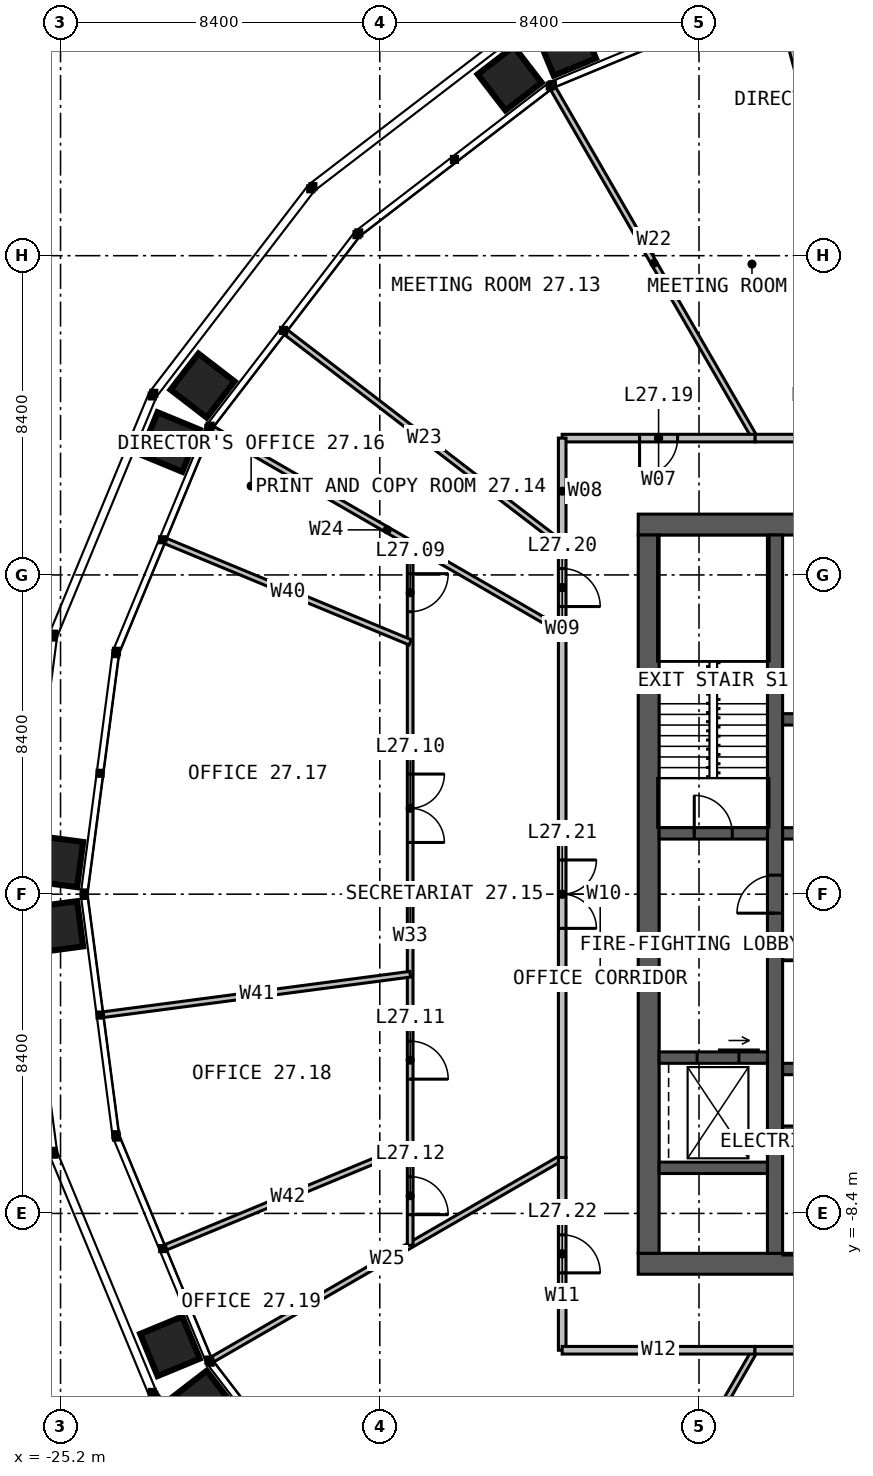
"""IFC4 building model, lengths in metres.
Left out: names, types, materials, properties, quantities, classifications, styles, units other than length and angle.
Written with IfcOpenShell. Run it as: python <this file> out.ifc"""

import sys

from ifc_helpers import new_model, si_unit, direction, frame, frame_2d, origin, place, context, subcontext, project, spatial, rectangle, extrude, element, fill, save


model = new_model("IFC4")
c1 = context("Model", 3, precision=1e-05, world=origin(), true_north=direction((0.0, 1.0)))
c2 = subcontext(c1, "Body", "Model", "MODEL_VIEW")
j1 = project(units=[si_unit("LENGTHUNIT", "METRE"), si_unit("PLANEANGLEUNIT", "RADIAN")], contexts=[c1])
p1 = place(None, origin())
s1 = spatial("IfcSite", under=j1, at=p1, CompositionType="ELEMENT")
p2 = place(p1, origin())
s2 = spatial("IfcBuilding", under=s1, at=p2, CompositionType="ELEMENT")
p3 = place(p2, frame((0.0, 0.0, 114.0)))
s3 = spatial("IfcBuildingStorey", under=s2, at=p3, CompositionType="ELEMENT", Elevation=114.0)
p4 = place(p3, frame((-10.0, 9.725, 0.0), z_axis=(0.0, 0.0, 1.0), x_axis=(1.0, 0.0, 0.0)))
e1 = element("IfcWall", 1, at=p4, inside=s3, PredefinedType="SOLIDWALL", context=c2, shape_type="SweptSolid", body=[
    extrude(rectangle(XDim=20.0, YDim=0.55, at=frame_2d((10.0, 0.0))), origin(), (0.0, 0.0, 1.0), 4.0),
])
p5 = place(p4, frame((9.4, 0.0, 0.0)))
e2 = element("IfcOpeningElement", 2, at=p5, cuts=e1, PredefinedType="OPENING", context=c2, shape_type="SweptSolid", body=[
    extrude(rectangle(XDim=1.2, YDim=2.2, at=frame_2d((0.6, 1.1))), frame((0.0, 0.285, 0.0), z_axis=(0.0, -1.0, 0.0), x_axis=(1.0, 0.0, 0.0)), (0.0, 0.0, 1.0), 0.57),
])
p6 = place(p3, frame((10.0, -9.725, 0.0), z_axis=(0.0, 0.0, 1.0), x_axis=(-1.0, 0.0, 0.0)))
e3 = element("IfcWall", 3, at=p6, inside=s3, PredefinedType="SOLIDWALL", context=c2, shape_type="SweptSolid", body=[
    extrude(rectangle(XDim=20.0, YDim=0.55, at=frame_2d((10.0, 0.0))), origin(), (0.0, 0.0, 1.0), 4.0),
])
p7 = place(p6, frame((6.875, 0.0, 0.0)))
e4 = element("IfcOpeningElement", 4, at=p7, cuts=e3, PredefinedType="OPENING", context=c2, shape_type="SweptSolid", body=[
    extrude(rectangle(XDim=1.2, YDim=2.2, at=frame_2d((0.6, 1.1))), frame((0.0, 0.285, 0.0), z_axis=(0.0, -1.0, 0.0), x_axis=(1.0, 0.0, 0.0)), (0.0, 0.0, 1.0), 0.57),
])
p8 = place(p3, frame((-9.725, 9.45, 0.0), z_axis=(0.0, 0.0, 1.0), x_axis=(0.0, -1.0, 0.0)))
e5 = element("IfcWall", 5, at=p8, inside=s3, PredefinedType="SOLIDWALL", context=c2, shape_type="SweptSolid", body=[
    extrude(rectangle(XDim=18.9, YDim=0.55, at=frame_2d((9.45, 0.0))), origin(), (0.0, 0.0, 1.0), 4.0),
])
p9 = place(p3, frame((-6.4, -9.45, 0.0), z_axis=(0.0, 0.0, 1.0), x_axis=(0.0, 1.0, 0.0)))
e6 = element("IfcWall", 6, at=p9, inside=s3, PredefinedType="SOLIDWALL", context=c2, shape_type="SweptSolid", body=[
    extrude(rectangle(XDim=18.9, YDim=0.4, at=frame_2d((9.45, 0.0))), origin(), (0.0, 0.0, 1.0), 4.0),
])
p10 = place(p9, frame((8.95, 0.0, 0.0)))
e7 = element("IfcOpeningElement", 7, at=p10, cuts=e6, PredefinedType="OPENING", context=c2, shape_type="SweptSolid", body=[
    extrude(rectangle(XDim=1.0, YDim=2.2, at=frame_2d((0.5, 1.1))), frame((0.0, 0.21, 0.0), z_axis=(0.0, -1.0, 0.0), x_axis=(1.0, 0.0, 0.0)), (0.0, 0.0, 1.0), 0.42),
])
p11 = place(p3, frame((-6.2, 1.6, 0.0), z_axis=(0.0, 0.0, 1.0), x_axis=(1.0, 0.0, 0.0)))
e8 = element("IfcWall", 8, at=p11, inside=s3, PredefinedType="SOLIDWALL", context=c2, shape_type="SweptSolid", body=[
    extrude(rectangle(XDim=4.85, YDim=0.3, at=frame_2d((2.425, 0.0))), origin(), (0.0, 0.0, 1.0), 4.0),
])
p12 = place(p11, frame((0.625, 0.0, 0.0)))
e9 = element("IfcOpeningElement", 9, at=p12, cuts=e8, PredefinedType="OPENING", context=c2, shape_type="SweptSolid", body=[
    extrude(rectangle(XDim=1.1, YDim=2.2, at=frame_2d((0.55, 1.1))), frame((0.0, 0.16, 0.0), z_axis=(0.0, -1.0, 0.0), x_axis=(1.0, 0.0, 0.0)), (0.0, 0.0, 1.0), 0.32),
])
p13 = place(p11, frame((3.15, 0.0, 0.0)))
e10 = element("IfcOpeningElement", 10, at=p13, cuts=e8, PredefinedType="OPENING", context=c2, shape_type="SweptSolid", body=[
    extrude(rectangle(XDim=1.1, YDim=2.2, at=frame_2d((0.55, 1.1))), frame((0.0, 0.16, 0.0), z_axis=(0.0, -1.0, 0.0), x_axis=(1.0, 0.0, 0.0)), (0.0, 0.0, 1.0), 0.32),
])
p14 = place(p3, frame((-6.2, 4.6, 0.0), z_axis=(0.0, 0.0, 1.0), x_axis=(1.0, 0.0, 0.0)))
e11 = element("IfcWall", 11, at=p14, inside=s3, PredefinedType="SOLIDWALL", context=c2, shape_type="SweptSolid", body=[
    extrude(rectangle(XDim=4.85, YDim=0.3, at=frame_2d((2.425, 0.0))), origin(), (0.0, 0.0, 1.0), 4.0),
])
for number, where, z_axis, x_axis in (
    (12, (-6.2, -1.6, 0.0), (0.0, 0.0, 1.0), (1.0, 0.0, 0.0)),
    (13, (-6.2, -4.6, 0.0), (0.0, 0.0, 1.0), (1.0, 0.0, 0.0)),
):
    element("IfcWall", number, at=place(p3, frame(where, z_axis=z_axis, x_axis=x_axis)), inside=s3, PredefinedType="SOLIDWALL", context=c2, shape_type="SweptSolid", body=[
        extrude(rectangle(XDim=7.4, YDim=0.3, at=frame_2d((3.7, 0.0))), origin(), (0.0, 0.0, 1.0), 4.0),
    ])
p15 = place(p3, frame((-6.2, -6.2, 0.0), z_axis=(0.0, 0.0, 1.0), x_axis=(1.0, 0.0, 0.0)))
e14 = element("IfcWall", 14, at=p15, inside=s3, PredefinedType="SOLIDWALL", context=c2, shape_type="SweptSolid", body=[
    extrude(rectangle(XDim=7.4, YDim=0.2, at=frame_2d((3.7, 0.0))), origin(), (0.0, 0.0, 1.0), 4.0),
])
p16 = place(p3, frame((-9.45, 1.6, 0.0), z_axis=(0.0, 0.0, 1.0), x_axis=(1.0, 0.0, 0.0)))
e15 = element("IfcWall", 15, at=p16, inside=s3, PredefinedType="SOLIDWALL", context=c2, shape_type="SweptSolid", body=[
    extrude(rectangle(XDim=2.85, YDim=0.3, at=frame_2d((1.425, 0.0))), origin(), (0.0, 0.0, 1.0), 4.0),
])
p17 = place(p16, frame((0.925, 0.0, 0.0)))
e16 = element("IfcOpeningElement", 16, at=p17, cuts=e15, PredefinedType="OPENING", context=c2, shape_type="SweptSolid", body=[
    extrude(rectangle(XDim=1.0, YDim=2.2, at=frame_2d((0.5, 1.1))), frame((0.0, 0.16, 0.0), z_axis=(0.0, -1.0, 0.0), x_axis=(1.0, 0.0, 0.0)), (0.0, 0.0, 1.0), 0.32),
])
p18 = place(p3, frame((-9.45, -4.3, 0.0), z_axis=(0.0, 0.0, 1.0), x_axis=(1.0, 0.0, 0.0)))
e17 = element("IfcWall", 17, at=p18, inside=s3, PredefinedType="SOLIDWALL", context=c2, shape_type="SweptSolid", body=[
    extrude(rectangle(XDim=2.85, YDim=0.3, at=frame_2d((1.425, 0.0))), origin(), (0.0, 0.0, 1.0), 4.0),
])
p19 = place(p18, frame((1.0, 0.0, 0.0)))
e18 = element("IfcOpeningElement", 18, at=p19, cuts=e17, PredefinedType="OPENING", context=c2, shape_type="SweptSolid", body=[
    extrude(rectangle(XDim=1.1, YDim=2.2, at=frame_2d((0.55, 1.1))), frame((0.0, 0.16, 0.0), z_axis=(0.0, -1.0, 0.0), x_axis=(1.0, 0.0, 0.0)), (0.0, 0.0, 1.0), 0.32),
])
p20 = place(p3, frame((-9.45, -7.2, 0.0), z_axis=(0.0, 0.0, 1.0), x_axis=(1.0, 0.0, 0.0)))
e19 = element("IfcWall", 19, at=p20, inside=s3, PredefinedType="SOLIDWALL", context=c2, shape_type="SweptSolid", body=[
    extrude(rectangle(XDim=2.85, YDim=0.3, at=frame_2d((1.425, 0.0))), origin(), (0.0, 0.0, 1.0), 4.0),
])
p21 = place(p3, frame((-3.215, 12.0, 0.0), z_axis=(0.0, 0.0, 1.0), x_axis=(-0.258814986396, 0.965926913807, 0.0)))
e20 = element("IfcWall", 20, at=p21, inside=s3, PredefinedType="PARTITIONING", context=c2, shape_type="SweptSolid", body=[
    extrude(rectangle(XDim=12.064, YDim=0.15, at=frame_2d((6.032, 0.0))), origin(), (0.0, 0.0, 1.0), 2.79),
])
p22 = place(p3, frame((-6.928, 12.0, 0.0), z_axis=(0.0, 0.0, 1.0), x_axis=(-0.500002090115, 0.866024197053, 0.0)))
e21 = element("IfcWall", 21, at=p22, inside=s3, PredefinedType="PARTITIONING", context=c2, shape_type="SweptSolid", body=[
    extrude(rectangle(XDim=10.631, YDim=0.15, at=frame_2d((5.315, 0.0))), origin(), (0.0, 0.0, 1.0), 2.79),
])
p23 = place(p3, frame((-12.0, 9.208, 0.0), z_axis=(0.0, 0.0, 1.0), x_axis=(-0.793357264949, 0.608756314261, 0.0)))
e22 = element("IfcWall", 22, at=p23, inside=s3, PredefinedType="PARTITIONING", context=c2, shape_type="SweptSolid", body=[
    extrude(rectangle(XDim=9.152, YDim=0.15, at=frame_2d((4.576, 0.0))), origin(), (0.0, 0.0, 1.0), 2.79),
])
for number, where, z_axis, x_axis in (
    (23, (-12.0, 6.928, 0.0), (0.0, 0.0, 1.0), (-0.866, 0.5, 0.0)),
    (24, (-12.0, -6.928, 0.0), (0.0, 0.0, 1.0), (-0.866, -0.5, 0.0)),
    (25, (-6.928, -12.0, 0.0), (0.0, 0.0, 1.0), (-0.5, -0.866, 0.0)),
):
    element("IfcWall", number, at=place(p3, frame(where, z_axis=z_axis, x_axis=x_axis)), inside=s3, PredefinedType="PARTITIONING", context=c2, shape_type="SweptSolid", body=[
        extrude(rectangle(XDim=10.631, YDim=0.15, at=frame_2d((5.315, 0.0))), origin(), (0.0, 0.0, 1.0), 2.79),
    ])
p24 = place(p3, frame((-3.215, 12.0, 0.0), z_axis=(0.0, 0.0, 1.0), x_axis=(-1.0, 0.0, 0.0)))
e26 = element("IfcWall", 26, at=p24, inside=s3, PredefinedType="PARTITIONING", context=c2, shape_type="SweptSolid", body=[
    extrude(rectangle(XDim=3.713, YDim=0.2, at=frame_2d((1.856, 0.0))), origin(), (0.0, 0.0, 1.0), 3.8),
])
p25 = place(p24, frame((1.356, 0.0, 0.0)))
e27 = element("IfcOpeningElement", 27, at=p25, cuts=e26, PredefinedType="OPENING", context=c2, shape_type="SweptSolid", body=[
    extrude(rectangle(XDim=1.0, YDim=2.2, at=frame_2d((0.5, 1.1))), frame((0.0, 0.11, 0.0), z_axis=(0.0, -1.0, 0.0), x_axis=(1.0, 0.0, 0.0)), (0.0, 0.0, 1.0), 0.22),
])
p26 = place(p3, frame((-6.928, 12.0, 0.0), z_axis=(0.0, 0.0, 1.0), x_axis=(-1.0, 0.0, 0.0)))
e28 = element("IfcWall", 28, at=p26, inside=s3, PredefinedType="PARTITIONING", context=c2, shape_type="SweptSolid", body=[
    extrude(rectangle(XDim=5.072, YDim=0.2, at=frame_2d((2.536, 0.0))), origin(), (0.0, 0.0, 1.0), 3.8),
])
p27 = place(p26, frame((2.036, 0.0, 0.0)))
e29 = element("IfcOpeningElement", 29, at=p27, cuts=e28, PredefinedType="OPENING", context=c2, shape_type="SweptSolid", body=[
    extrude(rectangle(XDim=1.0, YDim=2.2, at=frame_2d((0.5, 1.1))), frame((0.0, 0.11, 0.0), z_axis=(0.0, -1.0, 0.0), x_axis=(1.0, 0.0, 0.0)), (0.0, 0.0, 1.0), 0.22),
])
p28 = place(p3, frame((-12.0, 12.0, 0.0), z_axis=(0.0, 0.0, 1.0), x_axis=(0.0, -1.0, 0.0)))
e30 = element("IfcWall", 30, at=p28, inside=s3, PredefinedType="PARTITIONING", context=c2, shape_type="SweptSolid", body=[
    extrude(rectangle(XDim=2.792, YDim=0.2, at=frame_2d((1.396, 0.0))), origin(), (0.0, 0.0, 1.0), 3.8),
])
p29 = place(p3, frame((-12.0, 9.208, 0.0), z_axis=(0.0, 0.0, 1.0), x_axis=(0.0, -1.0, 0.0)))
e31 = element("IfcWall", 31, at=p29, inside=s3, PredefinedType="PARTITIONING", context=c2, shape_type="SweptSolid", body=[
    extrude(rectangle(XDim=2.28, YDim=0.2, at=frame_2d((1.14, 0.0))), origin(), (0.0, 0.0, 1.0), 3.8),
])
p30 = place(p29, frame((0.64, 0.0, 0.0)))
e32 = element("IfcOpeningElement", 32, at=p30, cuts=e31, PredefinedType="OPENING", context=c2, shape_type="SweptSolid", body=[
    extrude(rectangle(XDim=1.0, YDim=2.2, at=frame_2d((0.5, 1.1))), frame((0.0, 0.11, 0.0), z_axis=(0.0, -1.0, 0.0), x_axis=(1.0, 0.0, 0.0)), (0.0, 0.0, 1.0), 0.22),
])
p31 = place(p3, frame((-16.0, 9.238, 0.0), z_axis=(0.0, 0.0, 1.0), x_axis=(0.0, -1.0, 0.0)))
e33 = element("IfcWall", 33, at=p31, inside=s3, PredefinedType="PARTITIONING", context=c2, shape_type="SweptSolid", body=[
    extrude(rectangle(XDim=18.475, YDim=0.15, at=frame_2d((9.238, 0.0))), origin(), (0.0, 0.0, 1.0), 2.79),
])
p32 = place(p31, frame((0.805, 0.0, 0.0)))
e34 = element("IfcOpeningElement", 34, at=p32, cuts=e33, PredefinedType="OPENING", context=c2, shape_type="SweptSolid", body=[
    extrude(rectangle(XDim=1.0, YDim=2.2, at=frame_2d((0.5, 1.1))), frame((0.0, 0.085, 0.0), z_axis=(0.0, -1.0, 0.0), x_axis=(1.0, 0.0, 0.0)), (0.0, 0.0, 1.0), 0.17),
])
p33 = place(p31, frame((6.077, 0.0, 0.0)))
e35 = element("IfcOpeningElement", 35, at=p33, cuts=e33, PredefinedType="OPENING", context=c2, shape_type="SweptSolid", body=[
    extrude(rectangle(XDim=1.8, YDim=2.2, at=frame_2d((0.9, 1.1))), frame((0.0, 0.085, 0.0), z_axis=(0.0, -1.0, 0.0), x_axis=(1.0, 0.0, 0.0)), (0.0, 0.0, 1.0), 0.17),
])
p34 = place(p31, frame((13.104, 0.0, 0.0)))
e36 = element("IfcOpeningElement", 36, at=p34, cuts=e33, PredefinedType="OPENING", context=c2, shape_type="SweptSolid", body=[
    extrude(rectangle(XDim=1.0, YDim=2.2, at=frame_2d((0.5, 1.1))), frame((0.0, 0.085, 0.0), z_axis=(0.0, -1.0, 0.0), x_axis=(1.0, 0.0, 0.0)), (0.0, 0.0, 1.0), 0.17),
])
p35 = place(p31, frame((16.67, 0.0, 0.0)))
e37 = element("IfcOpeningElement", 37, at=p35, cuts=e33, PredefinedType="OPENING", context=c2, shape_type="SweptSolid", body=[
    extrude(rectangle(XDim=1.0, YDim=2.2, at=frame_2d((0.5, 1.1))), frame((0.0, 0.085, 0.0), z_axis=(0.0, -1.0, 0.0), x_axis=(1.0, 0.0, 0.0)), (0.0, 0.0, 1.0), 0.17),
])
p36 = place(p3, frame((-16.0, 6.627, 0.0), z_axis=(0.0, 0.0, 1.0), x_axis=(-0.923876163616, 0.382691565496, 0.0)))
e38 = element("IfcWall", 38, at=p36, inside=s3, PredefinedType="PARTITIONING", context=c2, shape_type="SweptSolid", body=[
    extrude(rectangle(XDim=6.959, YDim=0.15, at=frame_2d((3.48, 0.0))), origin(), (0.0, 0.0, 1.0), 2.79),
])
p37 = place(p3, frame((-16.0, -2.106, 0.0), z_axis=(0.0, 0.0, 1.0), x_axis=(-0.99144398145, -0.13053287573, 0.0)))
e39 = element("IfcWall", 39, at=p37, inside=s3, PredefinedType="PARTITIONING", context=c2, shape_type="SweptSolid", body=[
    extrude(rectangle(XDim=8.14, YDim=0.15, at=frame_2d((4.07, 0.0))), origin(), (0.0, 0.0, 1.0), 2.79),
])
p38 = place(p3, frame((-16.0, -6.627, 0.0), z_axis=(0.0, 0.0, 1.0), x_axis=(-0.923876163616, -0.382691565496, 0.0)))
e40 = element("IfcWall", 40, at=p38, inside=s3, PredefinedType="PARTITIONING", context=c2, shape_type="SweptSolid", body=[
    extrude(rectangle(XDim=6.959, YDim=0.15, at=frame_2d((3.48, 0.0))), origin(), (0.0, 0.0, 1.0), 2.79),
])
p39 = place(p3, frame((-12.0, 6.928, 0.0), z_axis=(0.0, 0.0, 1.0), x_axis=(0.0, -1.0, 0.0)))
e41 = element("IfcWall", 41, at=p39, inside=s3, PredefinedType="PARTITIONING", context=c2, shape_type="SweptSolid", body=[
    extrude(rectangle(XDim=13.856, YDim=0.2, at=frame_2d((6.928, 0.0))), origin(), (0.0, 0.0, 1.0), 3.8),
])
p40 = place(p39, frame((6.028, 0.0, 0.0)))
e42 = element("IfcOpeningElement", 42, at=p40, cuts=e41, PredefinedType="OPENING", context=c2, shape_type="SweptSolid", body=[
    extrude(rectangle(XDim=1.8, YDim=2.2, at=frame_2d((0.9, 1.1))), frame((0.0, 0.11, 0.0), z_axis=(0.0, -1.0, 0.0), x_axis=(1.0, 0.0, 0.0)), (0.0, 0.0, 1.0), 0.22),
])
p41 = place(p3, frame((-12.0, -6.928, 0.0), z_axis=(0.0, 0.0, 1.0), x_axis=(0.0, -1.0, 0.0)))
e43 = element("IfcWall", 43, at=p41, inside=s3, PredefinedType="PARTITIONING", context=c2, shape_type="SweptSolid", body=[
    extrude(rectangle(XDim=5.072, YDim=0.2, at=frame_2d((2.536, 0.0))), origin(), (0.0, 0.0, 1.0), 3.8),
])
p42 = place(p41, frame((2.036, 0.0, 0.0)))
e44 = element("IfcOpeningElement", 44, at=p42, cuts=e43, PredefinedType="OPENING", context=c2, shape_type="SweptSolid", body=[
    extrude(rectangle(XDim=1.0, YDim=2.2, at=frame_2d((0.5, 1.1))), frame((0.0, 0.11, 0.0), z_axis=(0.0, -1.0, 0.0), x_axis=(1.0, 0.0, 0.0)), (0.0, 0.0, 1.0), 0.22),
])
p43 = place(p3, frame((-12.0, -12.0, 0.0), z_axis=(0.0, 0.0, 1.0), x_axis=(1.0, 0.0, 0.0)))
e45 = element("IfcWall", 45, at=p43, inside=s3, PredefinedType="PARTITIONING", context=c2, shape_type="SweptSolid", body=[
    extrude(rectangle(XDim=5.072, YDim=0.2, at=frame_2d((2.536, 0.0))), origin(), (0.0, 0.0, 1.0), 3.8),
])
p44 = place(p3, frame((-6.928, -12.0, 0.0), z_axis=(0.0, 0.0, 1.0), x_axis=(1.0, 0.0, 0.0)))
e46 = element("IfcWall", 46, at=p44, inside=s3, PredefinedType="PARTITIONING", context=c2, shape_type="SweptSolid", body=[
    extrude(rectangle(XDim=10.144, YDim=0.2, at=frame_2d((5.072, 0.0))), origin(), (0.0, 0.0, 1.0), 3.8),
])
p45 = place(p44, frame((4.172, 0.0, 0.0)))
e47 = element("IfcOpeningElement", 47, at=p45, cuts=e46, PredefinedType="OPENING", context=c2, shape_type="SweptSolid", body=[
    extrude(rectangle(XDim=1.8, YDim=2.2, at=frame_2d((0.9, 1.1))), frame((0.0, 0.11, 0.0), z_axis=(0.0, -1.0, 0.0), x_axis=(1.0, 0.0, 0.0)), (0.0, 0.0, 1.0), 0.22),
])
p46 = place(p10, origin())
e48 = element("IfcDoor", 48, at=p46, inside=s3, OperationType="SINGLE_SWING_LEFT", PredefinedType="DOOR", context=c2, shape_type="SweptSolid", body=[
    extrude(rectangle(XDim=1.0, YDim=2.2, at=frame_2d((0.5, 1.1))), frame((0.0, 0.025, 0.0), z_axis=(0.0, -1.0, 0.0), x_axis=(1.0, 0.0, 0.0)), (0.0, 0.0, 1.0), 0.05),
])
fill(e7, e48)
p47 = place(p17, origin())
e49 = element("IfcDoor", 49, at=p47, inside=s3, OperationType="SINGLE_SWING_LEFT", PredefinedType="DOOR", context=c2, shape_type="SweptSolid", body=[
    extrude(rectangle(XDim=1.0, YDim=2.2, at=frame_2d((0.5, 1.1))), frame((0.0, 0.025, 0.0), z_axis=(0.0, -1.0, 0.0), x_axis=(1.0, 0.0, 0.0)), (0.0, 0.0, 1.0), 0.05),
])
fill(e16, e49)
p48 = place(p19, origin())
e50 = element("IfcDoor", 50, at=p48, inside=s3, OperationType="SLIDING_TO_LEFT", PredefinedType="DOOR", context=c2, shape_type="SweptSolid", body=[
    extrude(rectangle(XDim=1.1, YDim=2.2, at=frame_2d((0.55, 1.1))), frame((0.0, 0.025, 0.0), z_axis=(0.0, -1.0, 0.0), x_axis=(1.0, 0.0, 0.0)), (0.0, 0.0, 1.0), 0.05),
])
fill(e18, e50)
p49 = place(p27, origin())
e51 = element("IfcDoor", 51, at=p49, inside=s3, OperationType="SINGLE_SWING_RIGHT", PredefinedType="DOOR", context=c2, shape_type="SweptSolid", body=[
    extrude(rectangle(XDim=1.0, YDim=2.2, at=frame_2d((0.5, 1.1))), frame((0.0, 0.025, 0.0), z_axis=(0.0, -1.0, 0.0), x_axis=(1.0, 0.0, 0.0)), (0.0, 0.0, 1.0), 0.05),
])
fill(e29, e51)
p50 = place(p30, origin())
e52 = element("IfcDoor", 52, at=p50, inside=s3, OperationType="SINGLE_SWING_RIGHT", PredefinedType="DOOR", context=c2, shape_type="SweptSolid", body=[
    extrude(rectangle(XDim=1.0, YDim=2.2, at=frame_2d((0.5, 1.1))), frame((0.0, 0.025, 0.0), z_axis=(0.0, -1.0, 0.0), x_axis=(1.0, 0.0, 0.0)), (0.0, 0.0, 1.0), 0.05),
])
fill(e32, e52)
p51 = place(p32, origin())
e53 = element("IfcDoor", 53, at=p51, inside=s3, OperationType="SINGLE_SWING_LEFT", PredefinedType="DOOR", context=c2, shape_type="SweptSolid", body=[
    extrude(rectangle(XDim=1.0, YDim=2.2, at=frame_2d((0.5, 1.1))), frame((0.0, 0.025, 0.0), z_axis=(0.0, -1.0, 0.0), x_axis=(1.0, 0.0, 0.0)), (0.0, 0.0, 1.0), 0.05),
])
fill(e34, e53)
p52 = place(p33, origin())
e54 = element("IfcDoor", 54, at=p52, inside=s3, OperationType="DOUBLE_DOOR_SINGLE_SWING", PredefinedType="DOOR", context=c2, shape_type="SweptSolid", body=[
    extrude(rectangle(XDim=1.8, YDim=2.2, at=frame_2d((0.9, 1.1))), frame((0.0, 0.025, 0.0), z_axis=(0.0, -1.0, 0.0), x_axis=(1.0, 0.0, 0.0)), (0.0, 0.0, 1.0), 0.05),
])
fill(e35, e54)
p53 = place(p34, origin())
e55 = element("IfcDoor", 55, at=p53, inside=s3, OperationType="SINGLE_SWING_RIGHT", PredefinedType="DOOR", context=c2, shape_type="SweptSolid", body=[
    extrude(rectangle(XDim=1.0, YDim=2.2, at=frame_2d((0.5, 1.1))), frame((0.0, 0.025, 0.0), z_axis=(0.0, -1.0, 0.0), x_axis=(1.0, 0.0, 0.0)), (0.0, 0.0, 1.0), 0.05),
])
fill(e36, e55)
p54 = place(p35, origin())
e56 = element("IfcDoor", 56, at=p54, inside=s3, OperationType="SINGLE_SWING_RIGHT", PredefinedType="DOOR", context=c2, shape_type="SweptSolid", body=[
    extrude(rectangle(XDim=1.0, YDim=2.2, at=frame_2d((0.5, 1.1))), frame((0.0, 0.025, 0.0), z_axis=(0.0, -1.0, 0.0), x_axis=(1.0, 0.0, 0.0)), (0.0, 0.0, 1.0), 0.05),
])
fill(e37, e56)
p55 = place(p40, origin())
e57 = element("IfcDoor", 57, at=p55, inside=s3, OperationType="DOUBLE_DOOR_SINGLE_SWING", PredefinedType="DOOR", context=c2, shape_type="SweptSolid", body=[
    extrude(rectangle(XDim=1.8, YDim=2.2, at=frame_2d((0.9, 1.1))), frame((0.0, 0.025, 0.0), z_axis=(0.0, -1.0, 0.0), x_axis=(1.0, 0.0, 0.0)), (0.0, 0.0, 1.0), 0.05),
])
fill(e42, e57)
p56 = place(p42, origin())
e58 = element("IfcDoor", 58, at=p56, inside=s3, OperationType="SINGLE_SWING_RIGHT", PredefinedType="DOOR", context=c2, shape_type="SweptSolid", body=[
    extrude(rectangle(XDim=1.0, YDim=2.2, at=frame_2d((0.5, 1.1))), frame((0.0, 0.025, 0.0), z_axis=(0.0, -1.0, 0.0), x_axis=(1.0, 0.0, 0.0)), (0.0, 0.0, 1.0), 0.05),
])
fill(e44, e58)
save(model, sys.argv[1])
